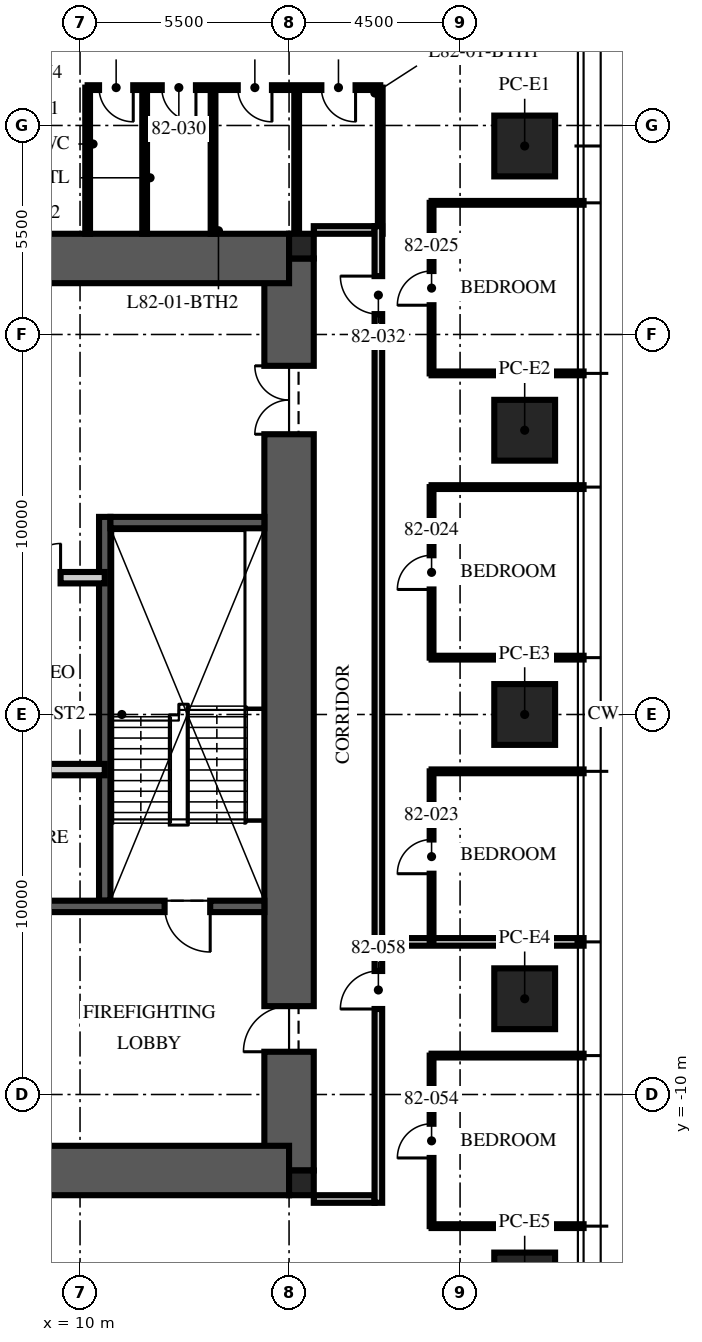
"""IFC4 building model, lengths in metres.
Left out: names, types, materials, properties, quantities, classifications, styles, units other than length and angle.
Written with IfcOpenShell. Run it as: python <this file> out.ifc"""

import sys

from ifc_helpers import new_model, si_unit, direction, frame, frame_2d, origin, origin_2d, place, context, subcontext, project, spatial, rectangle, extrude, element, fill, save


model = new_model("IFC4")
c1 = context("Model", 3, precision=1e-05, world=origin(), true_north=direction((0.0, 1.0)))
c2 = subcontext(c1, "Body", "Model", "MODEL_VIEW")
j1 = project(units=[si_unit("LENGTHUNIT", "METRE"), si_unit("PLANEANGLEUNIT", "RADIAN")], contexts=[c1])
p1 = place(None, origin())
s1 = spatial("IfcSite", under=j1, at=p1, CompositionType="ELEMENT")
p2 = place(p1, origin())
s2 = spatial("IfcBuilding", under=s1, at=p2, CompositionType="ELEMENT")
p3 = place(p2, frame((0.0, 0.0, 327.0)))
s3 = spatial("IfcBuildingStorey", under=s2, at=p3, CompositionType="ELEMENT", Elevation=327.0)
p4 = place(p3, frame((15.5, -12.0, -0.25), z_axis=(0.0, 0.0, 1.0), x_axis=(0.0, 1.0, 0.0)))
e1 = element("IfcWall", 1, at=p4, inside=s3, PredefinedType="SHEAR", context=c2, shape_type="SweptSolid", body=[
    extrude(rectangle(XDim=24.0, YDim=1.3, at=frame_2d((12.0, 0.0))), origin(), (0.0, 0.0, 1.0), 3.75),
])
p5 = place(p4, frame((3.125, 0.0, 0.25)))
e2 = element("IfcOpeningElement", 2, at=p5, cuts=e1, PredefinedType="OPENING", context=c2, shape_type="SweptSolid", body=[
    extrude(rectangle(XDim=1.2, YDim=2.1, at=frame_2d((0.6, 1.05))), frame((0.0, 0.66, 0.0), z_axis=(0.0, -1.0, 0.0), x_axis=(1.0, 0.0, 0.0)), (0.0, 0.0, 1.0), 1.32),
])
p6 = place(p4, frame((19.375, 0.0, 0.25)))
e3 = element("IfcOpeningElement", 3, at=p6, cuts=e1, PredefinedType="OPENING", context=c2, shape_type="SweptSolid", body=[
    extrude(rectangle(XDim=1.8, YDim=2.1, at=frame_2d((0.9, 1.05))), frame((0.0, 0.66, 0.0), z_axis=(0.0, -1.0, 0.0), x_axis=(1.0, 0.0, 0.0)), (0.0, 0.0, 1.0), 1.32),
])
for number, where, z_axis, x_axis in (
    (4, (-15.5, 12.0, -0.25), (0.0, 0.0, 1.0), (1.0, 0.0, 0.0)),
    (5, (-15.5, -12.0, -0.25), (0.0, 0.0, 1.0), (1.0, 0.0, 0.0)),
):
    element("IfcWall", number, at=place(p3, frame(where, z_axis=z_axis, x_axis=x_axis)), inside=s3, PredefinedType="SHEAR", context=c2, shape_type="SweptSolid", body=[
        extrude(rectangle(XDim=31.0, YDim=1.3, at=frame_2d((15.5, 0.0))), origin(), (0.0, 0.0, 1.0), 3.75),
    ])
for number, where, z_axis, x_axis in (
    (6, (15.825, 12.325, -0.25), (0.0, 0.0, 1.0), (1.0, 0.0, 0.0)),
    (7, (15.825, -12.325, -0.25), (0.0, 0.0, 1.0), (1.0, 0.0, 0.0)),
):
    element("IfcColumn", number, at=place(p3, frame(where, z_axis=z_axis, x_axis=x_axis)), inside=s3, PredefinedType="COLUMN", context=c2, shape_type="SweptSolid", body=[
        extrude(rectangle(XDim=0.65, YDim=0.65, at=origin_2d()), origin(), (0.0, 0.0, 1.0), 3.75),
    ])
for number, where, z_axis, x_axis in (
    (8, (21.7, 14.96, 0.0), (0.0, 0.0, 1.0), (0.0, 1.0, 0.0)),
    (9, (21.7, 7.48, 0.0), (0.0, 0.0, 1.0), (0.0, 1.0, 0.0)),
    (10, (21.7, 0.0, 0.0), (0.0, 0.0, 1.0), (0.0, 1.0, 0.0)),
    (11, (21.7, -7.48, 0.0), (0.0, 0.0, 1.0), (0.0, 1.0, 0.0)),
    (12, (21.7, -14.96, 0.0), (0.0, 0.0, 1.0), (0.0, 1.0, 0.0)),
):
    element("IfcColumn", number, at=place(p3, frame(where, z_axis=z_axis, x_axis=x_axis)), inside=s3, PredefinedType="COLUMN", context=c2, shape_type="SweptSolid", body=[
        extrude(rectangle(XDim=1.6, YDim=1.6, at=origin_2d()), origin(), (0.0, 0.0, 1.0), 3.75),
    ])
p7 = place(p3, frame((10.65, -4.9, 0.0), z_axis=(0.0, 0.0, 1.0), x_axis=(0.0, 1.0, 0.0)))
e13 = element("IfcWall", 13, at=p7, inside=s3, PredefinedType="SOLIDWALL", context=c2, shape_type="SweptSolid", body=[
    extrude(rectangle(XDim=10.1, YDim=0.3, at=frame_2d((5.05, 0.0))), origin(), (0.0, 0.0, 1.0), 3.5),
])
p8 = place(p3, frame((14.85, -5.05, 0.0), z_axis=(0.0, 0.0, 1.0), x_axis=(-1.0, 0.0, 0.0)))
e14 = element("IfcWall", 14, at=p8, inside=s3, PredefinedType="SOLIDWALL", context=c2, shape_type="SweptSolid", body=[
    extrude(rectangle(XDim=6.05, YDim=0.3, at=frame_2d((3.025, 0.0))), origin(), (0.0, 0.0, 1.0), 3.5),
])
p9 = place(p8, frame((1.425, 0.0, 0.0)))
e15 = element("IfcOpeningElement", 15, at=p9, cuts=e14, PredefinedType="OPENING", context=c2, shape_type="SweptSolid", body=[
    extrude(rectangle(XDim=1.2, YDim=2.1, at=frame_2d((0.6, 1.05))), frame((0.0, 0.16, 0.0), z_axis=(0.0, -1.0, 0.0), x_axis=(1.0, 0.0, 0.0)), (0.0, 0.0, 1.0), 0.32),
])
p10 = place(p3, frame((14.85, 5.05, 0.0), z_axis=(0.0, 0.0, 1.0), x_axis=(-1.0, 0.0, 0.0)))
e16 = element("IfcWall", 16, at=p10, inside=s3, PredefinedType="SOLIDWALL", context=c2, shape_type="SweptSolid", body=[
    extrude(rectangle(XDim=4.05, YDim=0.3, at=frame_2d((2.025, 0.0))), origin(), (0.0, 0.0, 1.0), 3.5),
])
p11 = place(p3, frame((-10.65, 3.6, 0.0), z_axis=(0.0, 0.0, 1.0), x_axis=(1.0, 0.0, 0.0)))
e17 = element("IfcWall", 17, at=p11, inside=s3, PredefinedType="PARTITIONING", context=c2, shape_type="SweptSolid", body=[
    extrude(rectangle(XDim=21.3, YDim=0.3, at=frame_2d((10.65, 0.0))), origin(), (0.0, 0.0, 1.0), 3.5),
])
p12 = place(p11, frame((10.05, 0.0, 0.0)))
e18 = element("IfcOpeningElement", 18, at=p12, cuts=e17, PredefinedType="OPENING", context=c2, shape_type="SweptSolid", body=[
    extrude(rectangle(XDim=1.2, YDim=2.1, at=frame_2d((0.6, 1.05))), frame((0.0, 0.16, 0.0), z_axis=(0.0, -1.0, 0.0), x_axis=(1.0, 0.0, 0.0)), (0.0, 0.0, 1.0), 0.32),
])
p13 = place(p11, frame((19.238, 0.0, 0.0)))
e19 = element("IfcOpeningElement", 19, at=p13, cuts=e17, PredefinedType="OPENING", context=c2, shape_type="SweptSolid", body=[
    extrude(rectangle(XDim=0.9, YDim=2.1, at=frame_2d((0.45, 1.05))), frame((0.0, 0.16, 0.0), z_axis=(0.0, -1.0, 0.0), x_axis=(1.0, 0.0, 0.0)), (0.0, 0.0, 1.0), 0.32),
])
p14 = place(p3, frame((10.65, -1.45, 0.0), z_axis=(0.0, 0.0, 1.0), x_axis=(-1.0, 0.0, 0.0)))
e20 = element("IfcWall", 20, at=p14, inside=s3, PredefinedType="PARTITIONING", context=c2, shape_type="SweptSolid", body=[
    extrude(rectangle(XDim=6.45, YDim=0.3, at=frame_2d((3.225, 0.0))), origin(), (0.0, 0.0, 1.0), 3.5),
])
for number, where, z_axis, x_axis in (
    (21, (16.15, 12.75, 0.0), (0.0, 0.0, 1.0), (1.0, 0.0, 0.0)),
    (22, (16.15, -12.75, 0.0), (0.0, 0.0, 1.0), (1.0, 0.0, 0.0)),
):
    element("IfcWall", number, at=place(p3, frame(where, z_axis=z_axis, x_axis=x_axis)), inside=s3, PredefinedType="PARTITIONING", context=c2, shape_type="SweptSolid", body=[
        extrude(rectangle(XDim=1.6, YDim=0.2, at=frame_2d((0.8, 0.0))), origin(), (0.0, 0.0, 1.0), 2.6),
    ])
p15 = place(p3, frame((17.95, -5.984, 0.0), z_axis=(0.0, 0.0, 1.0), x_axis=(1.0, 0.0, 0.0)))
e23 = element("IfcWall", 23, at=p15, inside=s3, PredefinedType="PARTITIONING", context=c2, shape_type="SweptSolid", body=[
    extrude(rectangle(XDim=5.3, YDim=0.2, at=frame_2d((2.65, 0.0))), origin(), (0.0, 0.0, 1.0), 3.01),
])
for number, where, z_axis, x_axis in (
    (24, (19.25, -1.496, 0.0), (0.0, 0.0, 1.0), (1.0, 0.0, 0.0)),
    (25, (19.25, 1.496, 0.0), (0.0, 0.0, 1.0), (1.0, 0.0, 0.0)),
    (26, (19.25, 5.984, 0.0), (0.0, 0.0, 1.0), (1.0, 0.0, 0.0)),
    (27, (19.25, 8.976, 0.0), (0.0, 0.0, 1.0), (1.0, 0.0, 0.0)),
    (28, (19.25, 13.464, 0.0), (0.0, 0.0, 1.0), (1.0, 0.0, 0.0)),
    (29, (19.25, -13.464, 0.0), (0.0, 0.0, 1.0), (1.0, 0.0, 0.0)),
    (30, (19.25, -8.976, 0.0), (0.0, 0.0, 1.0), (1.0, 0.0, 0.0)),
):
    element("IfcWall", number, at=place(p3, frame(where, z_axis=z_axis, x_axis=x_axis)), inside=s3, PredefinedType="PARTITIONING", context=c2, shape_type="SweptSolid", body=[
        extrude(rectangle(XDim=4.0, YDim=0.1, at=frame_2d((2.0, 0.0))), origin(), (0.0, 0.0, 1.0), 3.01),
    ])
p16 = place(p3, frame((19.25, -5.984, 0.0), z_axis=(0.0, 0.0, 1.0), x_axis=(0.0, 1.0, 0.0)))
e31 = element("IfcWall", 31, at=p16, inside=s3, PredefinedType="PARTITIONING", context=c2, shape_type="SweptSolid", body=[
    extrude(rectangle(XDim=4.488, YDim=0.1, at=frame_2d((2.244, 0.0))), origin(), (0.0, 0.0, 1.0), 2.91),
])
p17 = place(p16, frame((1.794, 0.0, 0.0)))
e32 = element("IfcOpeningElement", 32, at=p17, cuts=e31, PredefinedType="OPENING", context=c2, shape_type="SweptSolid", body=[
    extrude(rectangle(XDim=0.9, YDim=2.1, at=frame_2d((0.45, 1.05))), frame((0.0, 0.06, 0.0), z_axis=(0.0, -1.0, 0.0), x_axis=(1.0, 0.0, 0.0)), (0.0, 0.0, 1.0), 0.12),
])
p18 = place(p3, frame((19.25, 1.496, 0.0), z_axis=(0.0, 0.0, 1.0), x_axis=(0.0, 1.0, 0.0)))
e33 = element("IfcWall", 33, at=p18, inside=s3, PredefinedType="PARTITIONING", context=c2, shape_type="SweptSolid", body=[
    extrude(rectangle(XDim=4.488, YDim=0.1, at=frame_2d((2.244, 0.0))), origin(), (0.0, 0.0, 1.0), 2.91),
])
p19 = place(p18, frame((1.794, 0.0, 0.0)))
e34 = element("IfcOpeningElement", 34, at=p19, cuts=e33, PredefinedType="OPENING", context=c2, shape_type="SweptSolid", body=[
    extrude(rectangle(XDim=0.9, YDim=2.1, at=frame_2d((0.45, 1.05))), frame((0.0, 0.06, 0.0), z_axis=(0.0, -1.0, 0.0), x_axis=(1.0, 0.0, 0.0)), (0.0, 0.0, 1.0), 0.12),
])
p20 = place(p3, frame((19.25, 8.976, 0.0), z_axis=(0.0, 0.0, 1.0), x_axis=(0.0, 1.0, 0.0)))
e35 = element("IfcWall", 35, at=p20, inside=s3, PredefinedType="PARTITIONING", context=c2, shape_type="SweptSolid", body=[
    extrude(rectangle(XDim=4.488, YDim=0.1, at=frame_2d((2.244, 0.0))), origin(), (0.0, 0.0, 1.0), 2.91),
])
p21 = place(p20, frame((1.794, 0.0, 0.0)))
e36 = element("IfcOpeningElement", 36, at=p21, cuts=e35, PredefinedType="OPENING", context=c2, shape_type="SweptSolid", body=[
    extrude(rectangle(XDim=0.9, YDim=2.1, at=frame_2d((0.45, 1.05))), frame((0.0, 0.06, 0.0), z_axis=(0.0, -1.0, 0.0), x_axis=(1.0, 0.0, 0.0)), (0.0, 0.0, 1.0), 0.12),
])
p22 = place(p3, frame((17.9, 16.496, 0.0), z_axis=(0.0, 0.0, 1.0), x_axis=(-1.0, 0.0, 0.0)))
e37 = element("IfcWall", 37, at=p22, inside=s3, PredefinedType="PARTITIONING", context=c2, shape_type="SweptSolid", body=[
    extrude(rectangle(XDim=7.7, YDim=0.125, at=frame_2d((3.85, 0.0))), origin(), (0.0, 0.0, 1.0), 2.9),
])
p23 = place(p22, frame((0.65, 0.0, 0.0)))
e38 = element("IfcOpeningElement", 38, at=p23, cuts=e37, PredefinedType="OPENING", context=c2, shape_type="SweptSolid", body=[
    extrude(rectangle(XDim=0.9, YDim=2.1, at=frame_2d((0.45, 1.05))), frame((0.0, 0.073, 0.0), z_axis=(0.0, -1.0, 0.0), x_axis=(1.0, 0.0, 0.0)), (0.0, 0.0, 1.0), 0.145),
])
p24 = place(p22, frame((2.85, 0.0, 0.0)))
e39 = element("IfcOpeningElement", 39, at=p24, cuts=e37, PredefinedType="OPENING", context=c2, shape_type="SweptSolid", body=[
    extrude(rectangle(XDim=0.9, YDim=2.1, at=frame_2d((0.45, 1.05))), frame((0.0, 0.073, 0.0), z_axis=(0.0, -1.0, 0.0), x_axis=(1.0, 0.0, 0.0)), (0.0, 0.0, 1.0), 0.145),
])
p25 = place(p22, frame((4.85, 0.0, 0.0)))
e40 = element("IfcOpeningElement", 40, at=p25, cuts=e37, PredefinedType="OPENING", context=c2, shape_type="SweptSolid", body=[
    extrude(rectangle(XDim=0.9, YDim=2.1, at=frame_2d((0.45, 1.05))), frame((0.0, 0.073, 0.0), z_axis=(0.0, -1.0, 0.0), x_axis=(1.0, 0.0, 0.0)), (0.0, 0.0, 1.0), 0.145),
])
p26 = place(p22, frame((6.5, 0.0, 0.0)))
e41 = element("IfcOpeningElement", 41, at=p26, cuts=e37, PredefinedType="OPENING", context=c2, shape_type="SweptSolid", body=[
    extrude(rectangle(XDim=0.9, YDim=2.1, at=frame_2d((0.45, 1.05))), frame((0.0, 0.073, 0.0), z_axis=(0.0, -1.0, 0.0), x_axis=(1.0, 0.0, 0.0)), (0.0, 0.0, 1.0), 0.145),
])
for number, where, z_axis, x_axis in (
    (42, (17.9, 12.65, 0.0), (0.0, 0.0, 1.0), (0.0, 1.0, 0.0)),
    (43, (15.7, 12.65, 0.0), (0.0, 0.0, 1.0), (0.0, 1.0, 0.0)),
):
    element("IfcWall", number, at=place(p3, frame(where, z_axis=z_axis, x_axis=x_axis)), inside=s3, PredefinedType="PARTITIONING", context=c2, shape_type="SweptSolid", body=[
        extrude(rectangle(XDim=3.846, YDim=0.125, at=frame_2d((1.923, 0.0))), origin(), (0.0, 0.0, 1.0), 2.6),
    ])
for number, where, z_axis, x_axis in (
    (44, (13.5, 12.65, 0.0), (0.0, 0.0, 1.0), (0.0, 1.0, 0.0)),
    (45, (11.7, 12.65, 0.0), (0.0, 0.0, 1.0), (0.0, 1.0, 0.0)),
    (46, (10.2, 12.65, 0.0), (0.0, 0.0, 1.0), (0.0, 1.0, 0.0)),
):
    element("IfcWall", number, at=place(p3, frame(where, z_axis=z_axis, x_axis=x_axis)), inside=s3, PredefinedType="PARTITIONING", context=c2, shape_type="SweptSolid", body=[
        extrude(rectangle(XDim=3.846, YDim=0.125, at=frame_2d((1.923, 0.0))), origin(), (0.0, 0.0, 1.0), 3.5),
    ])
p27 = place(p3, frame((19.25, -13.464, 0.0), z_axis=(0.0, 0.0, 1.0), x_axis=(0.0, 1.0, 0.0)))
e47 = element("IfcWall", 47, at=p27, inside=s3, PredefinedType="PARTITIONING", context=c2, shape_type="SweptSolid", body=[
    extrude(rectangle(XDim=4.488, YDim=0.1, at=frame_2d((2.244, 0.0))), origin(), (0.0, 0.0, 1.0), 2.91),
])
p28 = place(p27, frame((1.794, 0.0, 0.0)))
e48 = element("IfcOpeningElement", 48, at=p28, cuts=e47, PredefinedType="OPENING", context=c2, shape_type="SweptSolid", body=[
    extrude(rectangle(XDim=0.9, YDim=2.1, at=frame_2d((0.45, 1.05))), frame((0.0, 0.06, 0.0), z_axis=(0.0, -1.0, 0.0), x_axis=(1.0, 0.0, 0.0)), (0.0, 0.0, 1.0), 0.12),
])
p29 = place(p3, frame((17.85, -12.85, 0.0), z_axis=(0.0, 0.0, 1.0), x_axis=(0.0, 1.0, 0.0)))
e49 = element("IfcWall", 49, at=p29, inside=s3, PredefinedType="PARTITIONING", context=c2, shape_type="SweptSolid", body=[
    extrude(rectangle(XDim=25.7, YDim=0.2, at=frame_2d((12.85, 0.0))), origin(), (0.0, 0.0, 1.0), 2.9),
])
p30 = place(p29, frame((23.386, 0.0, 0.0)))
e50 = element("IfcOpeningElement", 50, at=p30, cuts=e49, PredefinedType="OPENING", context=c2, shape_type="SweptSolid", body=[
    extrude(rectangle(XDim=1.0, YDim=2.2, at=frame_2d((0.5, 1.1))), frame((0.0, 0.11, 0.0), z_axis=(0.0, -1.0, 0.0), x_axis=(1.0, 0.0, 0.0)), (0.0, 0.0, 1.0), 0.22),
])
p31 = place(p29, frame((5.1, 0.0, 0.0)))
e51 = element("IfcOpeningElement", 51, at=p31, cuts=e49, PredefinedType="OPENING", context=c2, shape_type="SweptSolid", body=[
    extrude(rectangle(XDim=1.0, YDim=2.2, at=frame_2d((0.5, 1.1))), frame((0.0, 0.11, 0.0), z_axis=(0.0, -1.0, 0.0), x_axis=(1.0, 0.0, 0.0)), (0.0, 0.0, 1.0), 0.22),
])
p32 = place(p9, origin())
e52 = element("IfcDoor", 52, at=p32, inside=s3, OperationType="SINGLE_SWING_LEFT", PredefinedType="DOOR", context=c2, shape_type="SweptSolid", body=[
    extrude(rectangle(XDim=1.2, YDim=2.1, at=frame_2d((0.6, 1.05))), frame((0.0, 0.025, 0.0), z_axis=(0.0, -1.0, 0.0), x_axis=(1.0, 0.0, 0.0)), (0.0, 0.0, 1.0), 0.05),
])
fill(e15, e52)
p33 = place(p5, origin())
e53 = element("IfcDoor", 53, at=p33, inside=s3, OperationType="SINGLE_SWING_LEFT", PredefinedType="DOOR", context=c2, shape_type="SweptSolid", body=[
    extrude(rectangle(XDim=1.2, YDim=2.1, at=frame_2d((0.6, 1.05))), frame((0.0, 0.025, 0.0), z_axis=(0.0, -1.0, 0.0), x_axis=(1.0, 0.0, 0.0)), (0.0, 0.0, 1.0), 0.05),
])
fill(e2, e53)
p34 = place(p6, origin())
e54 = element("IfcDoor", 54, at=p34, inside=s3, OperationType="DOUBLE_DOOR_SINGLE_SWING", PredefinedType="DOOR", context=c2, shape_type="SweptSolid", body=[
    extrude(rectangle(XDim=1.8, YDim=2.1, at=frame_2d((0.9, 1.05))), frame((0.0, 0.025, 0.0), z_axis=(0.0, -1.0, 0.0), x_axis=(1.0, 0.0, 0.0)), (0.0, 0.0, 1.0), 0.05),
])
fill(e3, e54)
p35 = place(p13, origin())
e55 = element("IfcDoor", 55, at=p35, inside=s3, OperationType="SINGLE_SWING_RIGHT", PredefinedType="DOOR", context=c2, shape_type="SweptSolid", body=[
    extrude(rectangle(XDim=0.9, YDim=2.1, at=frame_2d((0.45, 1.05))), frame((0.0, 0.025, 0.0), z_axis=(0.0, -1.0, 0.0), x_axis=(1.0, 0.0, 0.0)), (0.0, 0.0, 1.0), 0.05),
])
fill(e19, e55)
p36 = place(p17, origin())
e56 = element("IfcDoor", 56, at=p36, inside=s3, OperationType="SINGLE_SWING_LEFT", PredefinedType="DOOR", context=c2, shape_type="SweptSolid", body=[
    extrude(rectangle(XDim=0.9, YDim=2.1, at=frame_2d((0.45, 1.05))), frame((0.0, 0.025, 0.0), z_axis=(0.0, -1.0, 0.0), x_axis=(1.0, 0.0, 0.0)), (0.0, 0.0, 1.0), 0.05),
])
fill(e32, e56)
p37 = place(p19, origin())
e57 = element("IfcDoor", 57, at=p37, inside=s3, OperationType="SINGLE_SWING_LEFT", PredefinedType="DOOR", context=c2, shape_type="SweptSolid", body=[
    extrude(rectangle(XDim=0.9, YDim=2.1, at=frame_2d((0.45, 1.05))), frame((0.0, 0.025, 0.0), z_axis=(0.0, -1.0, 0.0), x_axis=(1.0, 0.0, 0.0)), (0.0, 0.0, 1.0), 0.05),
])
fill(e34, e57)
p38 = place(p21, origin())
e58 = element("IfcDoor", 58, at=p38, inside=s3, OperationType="SINGLE_SWING_LEFT", PredefinedType="DOOR", context=c2, shape_type="SweptSolid", body=[
    extrude(rectangle(XDim=0.9, YDim=2.1, at=frame_2d((0.45, 1.05))), frame((0.0, 0.025, 0.0), z_axis=(0.0, -1.0, 0.0), x_axis=(1.0, 0.0, 0.0)), (0.0, 0.0, 1.0), 0.05),
])
fill(e36, e58)
p39 = place(p23, origin())
e59 = element("IfcDoor", 59, at=p39, inside=s3, OperationType="SINGLE_SWING_LEFT", PredefinedType="DOOR", context=c2, shape_type="SweptSolid", body=[
    extrude(rectangle(XDim=0.9, YDim=2.1, at=frame_2d((0.45, 1.05))), frame((0.0, 0.025, 0.0), z_axis=(0.0, -1.0, 0.0), x_axis=(1.0, 0.0, 0.0)), (0.0, 0.0, 1.0), 0.05),
])
fill(e38, e59)
p40 = place(p24, origin())
e60 = element("IfcDoor", 60, at=p40, inside=s3, OperationType="SINGLE_SWING_LEFT", PredefinedType="DOOR", context=c2, shape_type="SweptSolid", body=[
    extrude(rectangle(XDim=0.9, YDim=2.1, at=frame_2d((0.45, 1.05))), frame((0.0, 0.025, 0.0), z_axis=(0.0, -1.0, 0.0), x_axis=(1.0, 0.0, 0.0)), (0.0, 0.0, 1.0), 0.05),
])
fill(e39, e60)
p41 = place(p25, origin())
e61 = element("IfcDoor", 61, at=p41, inside=s3, OperationType="SINGLE_SWING_LEFT", PredefinedType="DOOR", context=c2, shape_type="SweptSolid", body=[
    extrude(rectangle(XDim=0.9, YDim=2.1, at=frame_2d((0.45, 1.05))), frame((0.0, 0.025, 0.0), z_axis=(0.0, -1.0, 0.0), x_axis=(1.0, 0.0, 0.0)), (0.0, 0.0, 1.0), 0.05),
])
fill(e40, e61)
p42 = place(p26, origin())
e62 = element("IfcDoor", 62, at=p42, inside=s3, OperationType="SINGLE_SWING_LEFT", PredefinedType="DOOR", context=c2, shape_type="SweptSolid", body=[
    extrude(rectangle(XDim=0.9, YDim=2.1, at=frame_2d((0.45, 1.05))), frame((0.0, 0.025, 0.0), z_axis=(0.0, -1.0, 0.0), x_axis=(1.0, 0.0, 0.0)), (0.0, 0.0, 1.0), 0.05),
])
fill(e41, e62)
p43 = place(p30, origin())
e63 = element("IfcDoor", 63, at=p43, inside=s3, OperationType="SINGLE_SWING_RIGHT", PredefinedType="DOOR", context=c2, shape_type="SweptSolid", body=[
    extrude(rectangle(XDim=1.0, YDim=2.2, at=frame_2d((0.5, 1.1))), frame((0.0, 0.025, 0.0), z_axis=(0.0, -1.0, 0.0), x_axis=(1.0, 0.0, 0.0)), (0.0, 0.0, 1.0), 0.05),
])
fill(e50, e63)
p44 = place(p28, origin())
e64 = element("IfcDoor", 64, at=p44, inside=s3, OperationType="SINGLE_SWING_LEFT", PredefinedType="DOOR", context=c2, shape_type="SweptSolid", body=[
    extrude(rectangle(XDim=0.9, YDim=2.1, at=frame_2d((0.45, 1.05))), frame((0.0, 0.025, 0.0), z_axis=(0.0, -1.0, 0.0), x_axis=(1.0, 0.0, 0.0)), (0.0, 0.0, 1.0), 0.05),
])
fill(e48, e64)
p45 = place(p31, origin())
e65 = element("IfcDoor", 65, at=p45, inside=s3, OperationType="SINGLE_SWING_LEFT", PredefinedType="DOOR", context=c2, shape_type="SweptSolid", body=[
    extrude(rectangle(XDim=1.0, YDim=2.2, at=frame_2d((0.5, 1.1))), frame((0.0, 0.025, 0.0), z_axis=(0.0, -1.0, 0.0), x_axis=(1.0, 0.0, 0.0)), (0.0, 0.0, 1.0), 0.05),
])
fill(e51, e65)
save(model, sys.argv[1])
